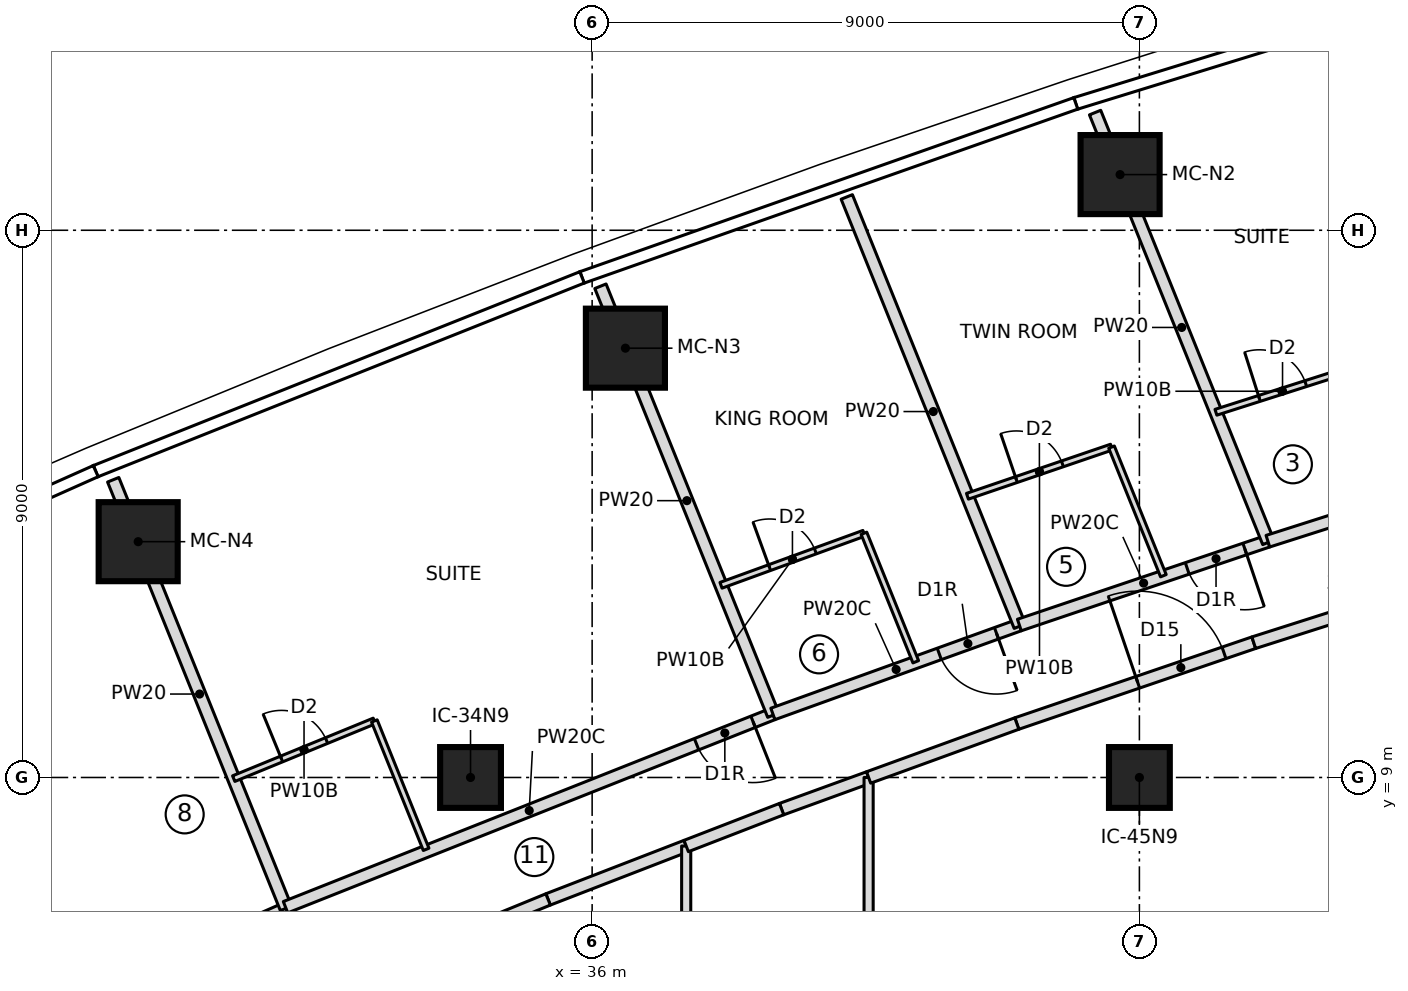
"""IFC4 building model, lengths in metres.
Left out: names, types, materials, properties, quantities, classifications, styles, units other than length and angle.
Written with IfcOpenShell. Run it as: python <this file> out.ifc"""

import sys

from ifc_helpers import new_model, si_unit, direction, frame, frame_2d, origin, origin_2d, place, context, subcontext, project, spatial, rectangle, extrude, element, fill, save


model = new_model("IFC4")
c1 = context("Model", 3, precision=1e-05, world=origin(), true_north=direction((0.0, 1.0)))
c2 = subcontext(c1, "Body", "Model", "MODEL_VIEW")
j1 = project(units=[si_unit("LENGTHUNIT", "METRE"), si_unit("PLANEANGLEUNIT", "RADIAN")], contexts=[c1])
p1 = place(None, origin())
s1 = spatial("IfcSite", under=j1, at=p1, CompositionType="ELEMENT")
p2 = place(p1, origin())
s2 = spatial("IfcBuilding", under=s1, at=p2, CompositionType="ELEMENT")
p3 = place(p2, frame((0.0, 0.0, 179.05)))
s3 = spatial("IfcBuildingStorey", under=s2, at=p3, CompositionType="ELEMENT", Elevation=179.05)
for number, where, z_axis, x_axis in (
    (1, (44.683, 18.916, 0.0), (0.0, 0.0, 1.0), (1.0, 0.0, 0.0)),
    (2, (36.547, 16.061, 0.0), (0.0, 0.0, 1.0), (1.0, 0.0, 0.0)),
    (3, (28.534, 12.878, 0.0), (0.0, 0.0, 1.0), (1.0, 0.0, 0.0)),
):
    element("IfcColumn", number, at=place(p3, frame(where, z_axis=z_axis, x_axis=x_axis)), inside=s3, PredefinedType="COLUMN", context=c2, shape_type="SweptSolid", body=[
        extrude(rectangle(XDim=1.3, YDim=1.3, at=origin_2d()), origin(), (0.0, 0.0, 1.0), 3.55),
    ])
for number, where, z_axis, x_axis in (
    (4, (34.0, 9.0, 0.0), (0.0, 0.0, 1.0), (1.0, 0.0, 0.0)),
    (5, (45.0, 9.0, 0.0), (0.0, 0.0, 1.0), (1.0, 0.0, 0.0)),
):
    element("IfcColumn", number, at=place(p3, frame(where, z_axis=z_axis, x_axis=x_axis)), inside=s3, PredefinedType="COLUMN", context=c2, shape_type="SweptSolid", body=[
        extrude(rectangle(XDim=1.0, YDim=1.0, at=origin_2d()), origin(), (0.0, 0.0, 1.0), 3.55),
    ])
p4 = place(p3, frame((23.085, 3.351, 0.0), z_axis=(0.0, 0.0, 1.0), x_axis=(0.914065936171, 0.405565610392, 0.0)))
e6 = element("IfcWall", 6, at=p4, inside=s3, PredefinedType="PARTITIONING", context=c2, shape_type="SweptSolid", body=[
    extrude(rectangle(XDim=8.622, YDim=0.2, at=frame_2d((4.311, 0.0))), origin(), (0.0, 0.0, 1.0), 3.25),
])
p5 = place(p4, frame((3.05, 0.0, 0.0)))
e7 = element("IfcOpeningElement", 7, at=p5, cuts=e6, PredefinedType="OPENING", context=c2, shape_type="SweptSolid", body=[
    extrude(rectangle(XDim=1.0, YDim=2.1, at=frame_2d((0.5, 1.05))), frame((0.0, 0.11, 0.0), z_axis=(0.0, -1.0, 0.0), x_axis=(1.0, 0.0, 0.0)), (0.0, 0.0, 1.0), 0.22),
])
p6 = place(p3, frame((30.965, 6.848, 0.0), z_axis=(0.0, 0.0, 1.0), x_axis=(-0.373876084216, 0.927478664796, 0.0)))
e8 = element("IfcWall", 8, at=p6, inside=s3, PredefinedType="PARTITIONING", context=c2, shape_type="SweptSolid", body=[
    extrude(rectangle(XDim=7.6, YDim=0.2, at=frame_2d((3.8, 0.0))), origin(), (0.0, 0.0, 1.0), 3.25),
])
p7 = place(p3, frame((38.972, 10.045, 0.0), z_axis=(0.0, 0.0, 1.0), x_axis=(-0.929554647243, -0.368684360651, 0.0)))
e9 = element("IfcWall", 9, at=p7, inside=s3, PredefinedType="PARTITIONING", context=c2, shape_type="SweptSolid", body=[
    extrude(rectangle(XDim=8.622, YDim=0.2, at=frame_2d((4.311, 0.0))), origin(), (0.0, 0.0, 1.0), 3.25),
])
p8 = place(p7, frame((0.35, 0.0, 0.0)))
e10 = element("IfcOpeningElement", 10, at=p8, cuts=e9, PredefinedType="OPENING", context=c2, shape_type="SweptSolid", body=[
    extrude(rectangle(XDim=1.0, YDim=2.1, at=frame_2d((0.5, 1.05))), frame((0.0, 0.11, 0.0), z_axis=(0.0, -1.0, 0.0), x_axis=(1.0, 0.0, 0.0)), (0.0, 0.0, 1.0), 0.22),
])
p9 = place(p3, frame((30.105, 8.981, 0.0), z_axis=(0.0, 0.0, 1.0), x_axis=(0.92519499486, 0.379492057212, 0.0)))
e11 = element("IfcWall", 11, at=p9, inside=s3, PredefinedType="PARTITIONING", context=c2, shape_type="SweptSolid", body=[
    extrude(rectangle(XDim=2.5, YDim=0.1, at=frame_2d((1.25, 0.0))), origin(), (0.0, 0.0, 1.0), 3.25),
])
p10 = place(p9, frame((0.85, 0.0, 0.0)))
e12 = element("IfcOpeningElement", 12, at=p10, cuts=e11, PredefinedType="OPENING", context=c2, shape_type="SweptSolid", body=[
    extrude(rectangle(XDim=0.8, YDim=2.1, at=frame_2d((0.4, 1.05))), frame((0.0, 0.06, 0.0), z_axis=(0.0, -1.0, 0.0), x_axis=(1.0, 0.0, 0.0)), (0.0, 0.0, 1.0), 0.12),
])
p11 = place(p3, frame((32.418, 9.93, 0.0), z_axis=(0.0, 0.0, 1.0), x_axis=(0.373847853912, -0.927490044219, 0.0)))
e13 = element("IfcWall", 13, at=p11, inside=s3, PredefinedType="PARTITIONING", context=c2, shape_type="SweptSolid", body=[
    extrude(rectangle(XDim=2.277, YDim=0.1, at=frame_2d((1.139, 0.0))), origin(), (0.0, 0.0, 1.0), 3.25),
])
p12 = place(p3, frame((38.98, 10.026, 0.0), z_axis=(0.0, 0.0, 1.0), x_axis=(-0.373863662938, 0.927483671843, 0.0)))
e14 = element("IfcWall", 14, at=p12, inside=s3, PredefinedType="PARTITIONING", context=c2, shape_type="SweptSolid", body=[
    extrude(rectangle(XDim=7.604, YDim=0.2, at=frame_2d((3.802, 0.0))), origin(), (0.0, 0.0, 1.0), 3.25),
])
p13 = place(p3, frame((43.026, 11.507, 0.0), z_axis=(0.0, 0.0, 1.0), x_axis=(-0.940653905433, -0.339367397069, 0.0)))
e15 = element("IfcWall", 15, at=p13, inside=s3, PredefinedType="PARTITIONING", context=c2, shape_type="SweptSolid", body=[
    extrude(rectangle(XDim=4.309, YDim=0.2, at=frame_2d((2.155, 0.0))), origin(), (0.0, 0.0, 1.0), 3.25),
])
p14 = place(p13, frame((0.4, 0.0, 0.0)))
e16 = element("IfcOpeningElement", 16, at=p14, cuts=e15, PredefinedType="OPENING", context=c2, shape_type="SweptSolid", body=[
    extrude(rectangle(XDim=1.0, YDim=2.1, at=frame_2d((0.5, 1.05))), frame((0.0, 0.11, 0.0), z_axis=(0.0, -1.0, 0.0), x_axis=(1.0, 0.0, 0.0)), (0.0, 0.0, 1.0), 0.22),
])
p15 = place(p3, frame((38.119, 12.161, 0.0), z_axis=(0.0, 0.0, 1.0), x_axis=(0.939744972593, 0.341876273652, 0.0)))
e17 = element("IfcWall", 17, at=p15, inside=s3, PredefinedType="PARTITIONING", context=c2, shape_type="SweptSolid", body=[
    extrude(rectangle(XDim=2.501, YDim=0.1, at=frame_2d((1.251, 0.0))), origin(), (0.0, 0.0, 1.0), 3.25),
])
p16 = place(p15, frame((0.85, 0.0, 0.0)))
e18 = element("IfcOpeningElement", 18, at=p16, cuts=e17, PredefinedType="OPENING", context=c2, shape_type="SweptSolid", body=[
    extrude(rectangle(XDim=0.8, YDim=2.1, at=frame_2d((0.4, 1.05))), frame((0.0, 0.06, 0.0), z_axis=(0.0, -1.0, 0.0), x_axis=(1.0, 0.0, 0.0)), (0.0, 0.0, 1.0), 0.12),
])
p17 = place(p3, frame((40.47, 13.016, 0.0), z_axis=(0.0, 0.0, 1.0), x_axis=(0.373846436826, -0.927490615409, 0.0)))
e19 = element("IfcWall", 19, at=p17, inside=s3, PredefinedType="PARTITIONING", context=c2, shape_type="SweptSolid", body=[
    extrude(rectangle(XDim=2.279, YDim=0.1, at=frame_2d((1.139, 0.0))), origin(), (0.0, 0.0, 1.0), 3.25),
])
p18 = place(p3, frame((43.033, 11.489, 0.0), z_axis=(0.0, 0.0, 1.0), x_axis=(-0.373877998371, 0.927477893178, 0.0)))
e20 = element("IfcWall", 20, at=p18, inside=s3, PredefinedType="PARTITIONING", context=c2, shape_type="SweptSolid", body=[
    extrude(rectangle(XDim=7.611, YDim=0.2, at=frame_2d((3.806, 0.0))), origin(), (0.0, 0.0, 1.0), 3.25),
])
p19 = place(p3, frame((47.113, 12.886, 0.0), z_axis=(0.0, 0.0, 1.0), x_axis=(-0.947550995841, -0.319604615549, 0.0)))
e21 = element("IfcWall", 21, at=p19, inside=s3, PredefinedType="PARTITIONING", context=c2, shape_type="SweptSolid", body=[
    extrude(rectangle(XDim=4.314, YDim=0.2, at=frame_2d((2.157, 0.0))), origin(), (0.0, 0.0, 1.0), 3.25),
])
p20 = place(p19, frame((0.4, 0.0, 0.0)))
e22 = element("IfcOpeningElement", 22, at=p20, cuts=e21, PredefinedType="OPENING", context=c2, shape_type="SweptSolid", body=[
    extrude(rectangle(XDim=1.0, YDim=2.1, at=frame_2d((0.5, 1.05))), frame((0.0, 0.11, 0.0), z_axis=(0.0, -1.0, 0.0), x_axis=(1.0, 0.0, 0.0)), (0.0, 0.0, 1.0), 0.22),
])
p21 = place(p3, frame((42.172, 13.625, 0.0), z_axis=(0.0, 0.0, 1.0), x_axis=(0.946406575113, 0.322977699822, 0.0)))
e23 = element("IfcWall", 23, at=p21, inside=s3, PredefinedType="PARTITIONING", context=c2, shape_type="SweptSolid", body=[
    extrude(rectangle(XDim=2.504, YDim=0.1, at=frame_2d((1.252, 0.0))), origin(), (0.0, 0.0, 1.0), 3.25),
])
p22 = place(p21, frame((0.85, 0.0, 0.0)))
e24 = element("IfcOpeningElement", 24, at=p22, cuts=e23, PredefinedType="OPENING", context=c2, shape_type="SweptSolid", body=[
    extrude(rectangle(XDim=0.8, YDim=2.1, at=frame_2d((0.4, 1.05))), frame((0.0, 0.06, 0.0), z_axis=(0.0, -1.0, 0.0), x_axis=(1.0, 0.0, 0.0)), (0.0, 0.0, 1.0), 0.12),
])
p23 = place(p3, frame((44.542, 14.434, 0.0), z_axis=(0.0, 0.0, 1.0), x_axis=(0.373917841166, -0.927461831052, 0.0)))
e25 = element("IfcWall", 25, at=p23, inside=s3, PredefinedType="PARTITIONING", context=c2, shape_type="SweptSolid", body=[
    extrude(rectangle(XDim=2.281, YDim=0.1, at=frame_2d((1.14, 0.0))), origin(), (0.0, 0.0, 1.0), 3.25),
])
p24 = place(p3, frame((47.121, 12.867, 0.0), z_axis=(0.0, 0.0, 1.0), x_axis=(-0.373907892596, 0.92746584188, 0.0)))
e26 = element("IfcWall", 26, at=p24, inside=s3, PredefinedType="PARTITIONING", context=c2, shape_type="SweptSolid", body=[
    extrude(rectangle(XDim=7.621, YDim=0.2, at=frame_2d((3.811, 0.0))), origin(), (0.0, 0.0, 1.0), 3.25),
])
p25 = place(p3, frame((46.259, 15.007, 0.0), z_axis=(0.0, 0.0, 1.0), x_axis=(0.952731222045, 0.303814447552, 0.0)))
e27 = element("IfcWall", 27, at=p25, inside=s3, PredefinedType="PARTITIONING", context=c2, shape_type="SweptSolid", body=[
    extrude(rectangle(XDim=2.277, YDim=0.1, at=frame_2d((1.138, 0.0))), origin(), (0.0, 0.0, 1.0), 3.25),
])
p26 = place(p25, frame((0.75, 0.0, 0.0)))
e28 = element("IfcOpeningElement", 28, at=p26, cuts=e27, PredefinedType="OPENING", context=c2, shape_type="SweptSolid", body=[
    extrude(rectangle(XDim=0.8, YDim=2.1, at=frame_2d((0.4, 1.05))), frame((0.0, 0.06, 0.0), z_axis=(0.0, -1.0, 0.0), x_axis=(1.0, 0.0, 0.0)), (0.0, 0.0, 1.0), 0.12),
])
p27 = place(p3, frame((35.276, 6.994, 0.0), z_axis=(0.0, 0.0, 1.0), x_axis=(0.932674754549, 0.36071845285, 0.0)))
e29 = element("IfcWall", 29, at=p27, inside=s3, PredefinedType="PARTITIONING", context=c2, shape_type="SweptSolid", body=[
    extrude(rectangle(XDim=2.435, YDim=0.2, at=frame_2d((1.218, 0.0))), origin(), (0.0, 0.0, 1.0), 3.25),
])
p28 = place(p3, frame((32.113, 5.697, 0.0), z_axis=(0.0, 0.0, 1.0), x_axis=(0.925194984271, 0.379492083026, 0.0)))
e30 = element("IfcWall", 30, at=p28, inside=s3, PredefinedType="PARTITIONING", context=c2, shape_type="SweptSolid", body=[
    extrude(rectangle(XDim=3.418, YDim=0.2, at=frame_2d((1.709, 0.0))), origin(), (0.0, 0.0, 1.0), 3.25),
])
p29 = place(p3, frame((37.547, -7.873, 0.0), z_axis=(0.0, 0.0, 1.0), x_axis=(0.0, 1.0, 0.0)))
e31 = element("IfcWall", 31, at=p29, inside=s3, PredefinedType="PARTITIONING", context=c2, shape_type="SweptSolid", body=[
    extrude(rectangle(XDim=15.746, YDim=0.15, at=frame_2d((7.873, 0.0))), origin(), (0.0, 0.0, 1.0), 3.25),
])
p30 = place(p3, frame((39.115, 8.479, 0.0), z_axis=(0.0, 0.0, 1.0), x_axis=(0.939741934926, 0.341884623435, 0.0)))
e32 = element("IfcWall", 32, at=p30, inside=s3, PredefinedType="PARTITIONING", context=c2, shape_type="SweptSolid", body=[
    extrude(rectangle(XDim=1.523, YDim=0.2, at=frame_2d((0.762, 0.0))), origin(), (0.0, 0.0, 1.0), 3.25),
])
p31 = place(p3, frame((37.547, 7.873, 0.0), z_axis=(0.0, 0.0, 1.0), x_axis=(0.932670528514, 0.360729379511, 0.0)))
e33 = element("IfcWall", 33, at=p31, inside=s3, PredefinedType="PARTITIONING", context=c2, shape_type="SweptSolid", body=[
    extrude(rectangle(XDim=1.682, YDim=0.2, at=frame_2d((0.841, 0.0))), origin(), (0.0, 0.0, 1.0), 3.25),
])
p32 = place(p3, frame((40.547, -9.0, 0.0), z_axis=(0.0, 0.0, 1.0), x_axis=(0.0, 1.0, 0.0)))
e34 = element("IfcWall", 34, at=p32, inside=s3, PredefinedType="PARTITIONING", context=c2, shape_type="SweptSolid", body=[
    extrude(rectangle(XDim=18.0, YDim=0.15, at=frame_2d((9.0, 0.0))), origin(), (0.0, 0.0, 1.0), 3.25),
])
p33 = place(p3, frame((42.984, 9.887, 0.0), z_axis=(0.0, 0.0, 1.0), x_axis=(0.946436071896, 0.322891253852, 0.0)))
e35 = element("IfcWall", 35, at=p33, inside=s3, PredefinedType="PARTITIONING", context=c2, shape_type="SweptSolid", body=[
    extrude(rectangle(XDim=4.117, YDim=0.2, at=frame_2d((2.059, 0.0))), origin(), (0.0, 0.0, 1.0), 3.25),
])
p34 = place(p33, frame((2.1, 0.0, 0.0)))
e36 = element("IfcOpeningElement", 36, at=p34, cuts=e35, PredefinedType="OPENING", context=c2, shape_type="SweptSolid", body=[
    extrude(rectangle(XDim=1.5, YDim=2.1, at=frame_2d((0.75, 1.05))), frame((0.0, 0.11, 0.0), z_axis=(0.0, -1.0, 0.0), x_axis=(1.0, 0.0, 0.0)), (0.0, 0.0, 1.0), 0.22),
])
p35 = place(p3, frame((40.547, 9.0, 0.0), z_axis=(0.0, 0.0, 1.0), x_axis=(0.939719202565, 0.341947101655, 0.0)))
e37 = element("IfcWall", 37, at=p35, inside=s3, PredefinedType="PARTITIONING", context=c2, shape_type="SweptSolid", body=[
    extrude(rectangle(XDim=2.594, YDim=0.2, at=frame_2d((1.297, 0.0))), origin(), (0.0, 0.0, 1.0), 3.25),
])
p36 = place(p3, frame((48.15, 13.217, 0.0), z_axis=(0.0, 0.0, 1.0), x_axis=(-0.952731090451, -0.303814860215, 0.0)))
e38 = element("IfcWall", 38, at=p36, inside=s3, PredefinedType="PARTITIONING", context=c2, shape_type="SweptSolid", body=[
    extrude(rectangle(XDim=1.088, YDim=0.2, at=frame_2d((0.544, 0.0))), origin(), (0.0, 0.0, 1.0), 3.25),
])
p37 = place(p3, frame((46.881, 11.217, 0.0), z_axis=(0.0, 0.0, 1.0), x_axis=(0.952761948983, 0.303718074157, 0.0)))
e39 = element("IfcWall", 39, at=p37, inside=s3, PredefinedType="PARTITIONING", context=c2, shape_type="SweptSolid", body=[
    extrude(rectangle(XDim=1.332, YDim=0.2, at=frame_2d((0.666, 0.0))), origin(), (0.0, 0.0, 1.0), 3.25),
])
p38 = place(p10, origin())
e40 = element("IfcDoor", 40, at=p38, inside=s3, OperationType="SINGLE_SWING_LEFT", PredefinedType="DOOR", context=c2, shape_type="SweptSolid", body=[
    extrude(rectangle(XDim=0.8, YDim=2.1, at=frame_2d((0.4, 1.05))), frame((0.0, 0.025, 0.0), z_axis=(0.0, -1.0, 0.0), x_axis=(1.0, 0.0, 0.0)), (0.0, 0.0, 1.0), 0.05),
])
fill(e12, e40)
p39 = place(p8, origin())
e41 = element("IfcDoor", 41, at=p39, inside=s3, OperationType="SINGLE_SWING_RIGHT", PredefinedType="DOOR", context=c2, shape_type="SweptSolid", body=[
    extrude(rectangle(XDim=1.0, YDim=2.1, at=frame_2d((0.5, 1.05))), frame((0.0, 0.025, 0.0), z_axis=(0.0, -1.0, 0.0), x_axis=(1.0, 0.0, 0.0)), (0.0, 0.0, 1.0), 0.05),
])
fill(e10, e41)
p40 = place(p16, origin())
e42 = element("IfcDoor", 42, at=p40, inside=s3, OperationType="SINGLE_SWING_LEFT", PredefinedType="DOOR", context=c2, shape_type="SweptSolid", body=[
    extrude(rectangle(XDim=0.8, YDim=2.1, at=frame_2d((0.4, 1.05))), frame((0.0, 0.025, 0.0), z_axis=(0.0, -1.0, 0.0), x_axis=(1.0, 0.0, 0.0)), (0.0, 0.0, 1.0), 0.05),
])
fill(e18, e42)
p41 = place(p14, origin())
e43 = element("IfcDoor", 43, at=p41, inside=s3, OperationType="SINGLE_SWING_RIGHT", PredefinedType="DOOR", context=c2, shape_type="SweptSolid", body=[
    extrude(rectangle(XDim=1.0, YDim=2.1, at=frame_2d((0.5, 1.05))), frame((0.0, 0.025, 0.0), z_axis=(0.0, -1.0, 0.0), x_axis=(1.0, 0.0, 0.0)), (0.0, 0.0, 1.0), 0.05),
])
fill(e16, e43)
p42 = place(p22, origin())
e44 = element("IfcDoor", 44, at=p42, inside=s3, OperationType="SINGLE_SWING_LEFT", PredefinedType="DOOR", context=c2, shape_type="SweptSolid", body=[
    extrude(rectangle(XDim=0.8, YDim=2.1, at=frame_2d((0.4, 1.05))), frame((0.0, 0.025, 0.0), z_axis=(0.0, -1.0, 0.0), x_axis=(1.0, 0.0, 0.0)), (0.0, 0.0, 1.0), 0.05),
])
fill(e24, e44)
p43 = place(p20, origin())
e45 = element("IfcDoor", 45, at=p43, inside=s3, OperationType="SINGLE_SWING_RIGHT", PredefinedType="DOOR", context=c2, shape_type="SweptSolid", body=[
    extrude(rectangle(XDim=1.0, YDim=2.1, at=frame_2d((0.5, 1.05))), frame((0.0, 0.025, 0.0), z_axis=(0.0, -1.0, 0.0), x_axis=(1.0, 0.0, 0.0)), (0.0, 0.0, 1.0), 0.05),
])
fill(e22, e45)
p44 = place(p26, origin())
e46 = element("IfcDoor", 46, at=p44, inside=s3, OperationType="SINGLE_SWING_LEFT", PredefinedType="DOOR", context=c2, shape_type="SweptSolid", body=[
    extrude(rectangle(XDim=0.8, YDim=2.1, at=frame_2d((0.4, 1.05))), frame((0.0, 0.025, 0.0), z_axis=(0.0, -1.0, 0.0), x_axis=(1.0, 0.0, 0.0)), (0.0, 0.0, 1.0), 0.05),
])
fill(e28, e46)
p45 = place(p34, origin())
e47 = element("IfcDoor", 47, at=p45, inside=s3, OperationType="DOUBLE_DOOR_SINGLE_SWING", PredefinedType="DOOR", context=c2, shape_type="SweptSolid", body=[
    extrude(rectangle(XDim=1.5, YDim=2.1, at=frame_2d((0.75, 1.05))), frame((0.0, 0.025, 0.0), z_axis=(0.0, -1.0, 0.0), x_axis=(1.0, 0.0, 0.0)), (0.0, 0.0, 1.0), 0.05),
])
fill(e36, e47)
save(model, sys.argv[1])
